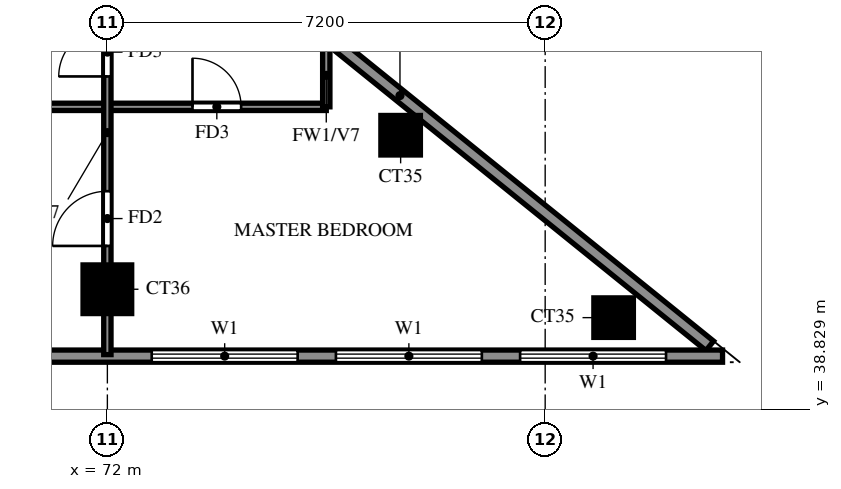
"""IFC4 building model, lengths in metres.
Left out: names, types, materials, properties, quantities, classifications, styles, units other than length and angle.
Written with IfcOpenShell. Run it as: python <this file> out.ifc"""

import sys

from ifc_helpers import new_model, si_unit, direction, frame, frame_2d, origin, origin_2d, place, context, subcontext, project, spatial, rectangle, extrude, source, transform, mapped, element, fill, save


model = new_model("IFC4")
c1 = context("Model", 3, precision=1e-05, world=origin(), true_north=direction((0.0, 1.0)))
c2 = subcontext(c1, "Body", "Model", "MODEL_VIEW")
j1 = project(units=[si_unit("LENGTHUNIT", "METRE"), si_unit("PLANEANGLEUNIT", "RADIAN")], contexts=[c1])
p1 = place(None, origin())
s1 = spatial("IfcSite", under=j1, at=p1, CompositionType="ELEMENT")
p2 = place(p1, origin())
s2 = spatial("IfcBuilding", under=s1, at=p2, CompositionType="ELEMENT")
p3 = place(p2, frame((0.0, 0.0, 250.0)))
s3 = spatial("IfcBuildingStorey", under=s2, at=p3, CompositionType="ELEMENT", Elevation=250.0)
m1 = source(origin(), c2, "Body", "SweptSolid", [
    extrude(rectangle(XDim=0.65, YDim=0.65, at=origin_2d()), origin(), (0.0, 0.0, 1.0), 3.22),
])
p4 = place(p3, frame((80.326, 40.333, 0.0), z_axis=(0.0, 0.0, 1.0), x_axis=(1.0, 0.0, 0.0)))
e1 = element("IfcColumn", 1, at=p4, inside=s3, PredefinedType="COLUMN", context=c2, shape_type="MappedRepresentation", body=[
    mapped(m1, transform((0.0, 0.0, 0.0))),
])
m2 = source(origin(), c2, "Body", "SweptSolid", [
    extrude(rectangle(XDim=0.8, YDim=0.8, at=origin_2d()), origin(), (0.0, 0.0, 1.0), 3.22),
])
p5 = place(p3, frame((72.0, 40.8, 0.0), z_axis=(0.0, 0.0, 1.0), x_axis=(1.0, 0.0, 0.0)))
e2 = element("IfcColumn", 2, at=p5, inside=s3, PredefinedType="COLUMN", context=c2, shape_type="MappedRepresentation", body=[
    mapped(m2, transform((0.0, 0.0, 0.0))),
])
p6 = place(p3, frame((76.823, 43.333, 0.0), z_axis=(0.0, 0.0, 1.0), x_axis=(1.0, 0.0, 0.0)))
e3 = element("IfcColumn", 3, at=p6, inside=s3, PredefinedType="COLUMN", context=c2, shape_type="MappedRepresentation", body=[
    mapped(m1, transform((0.0, 0.0, 0.0))),
])
p7 = place(p3, frame((81.907, 39.87, 0.0), z_axis=(0.0, 0.0, 1.0), x_axis=(-0.777936274417, 0.62834318087, 0.0)))
e4 = element("IfcWall", 4, at=p7, inside=s3, PredefinedType="SOLIDWALL", context=c2, shape_type="SweptSolid", body=[
    extrude(rectangle(XDim=13.099, YDim=0.2, at=frame_2d((6.549, 0.0))), origin(), (0.0, 0.0, 1.0), 3.22),
])
p8 = place(p7, frame((9.938, 0.0, 1.5)))
e5 = element("IfcOpeningElement", 5, at=p8, cuts=e4, PredefinedType="OPENING", context=c2, shape_type="SweptSolid", body=[
    extrude(rectangle(XDim=0.9, YDim=0.9, at=frame_2d((0.45, 0.45))), frame((0.0, 0.11, 0.0), z_axis=(0.0, -1.0, 0.0), x_axis=(1.0, 0.0, 0.0)), (0.0, 0.0, 1.0), 0.22),
])
p9 = place(p3, frame((58.8, 39.7, 0.0), z_axis=(0.0, 0.0, 1.0), x_axis=(1.0, 0.0, 0.0)))
e6 = element("IfcWall", 6, at=p9, inside=s3, PredefinedType="SOLIDWALL", context=c2, shape_type="SweptSolid", body=[
    extrude(rectangle(XDim=23.317, YDim=0.2, at=frame_2d((11.658, 0.0))), origin(), (0.0, 0.0, 1.0), 3.22),
])
p10 = place(p9, frame((6.9, 0.0, 0.0)))
e7 = element("IfcOpeningElement", 7, at=p10, cuts=e6, PredefinedType="OPENING", context=c2, shape_type="SweptSolid", body=[
    extrude(rectangle(XDim=1.8, YDim=2.4, at=frame_2d((0.9, 1.2))), frame((0.0, 0.11, 0.0), z_axis=(0.0, -1.0, 0.0), x_axis=(1.0, 0.0, 0.0)), (0.0, 0.0, 1.0), 0.22),
])
p11 = place(p9, frame((1.5, 0.0, 0.6)))
e8 = element("IfcOpeningElement", 8, at=p11, cuts=e6, PredefinedType="OPENING", context=c2, shape_type="SweptSolid", body=[
    extrude(rectangle(XDim=1.8, YDim=2.4, at=frame_2d((0.9, 1.2))), frame((0.0, 0.11, 0.0), z_axis=(0.0, -1.0, 0.0), x_axis=(1.0, 0.0, 0.0)), (0.0, 0.0, 1.0), 0.22),
])
p12 = place(p9, frame((4.5, 0.0, 0.6)))
e9 = element("IfcOpeningElement", 9, at=p12, cuts=e6, PredefinedType="OPENING", context=c2, shape_type="SweptSolid", body=[
    extrude(rectangle(XDim=1.8, YDim=2.4, at=frame_2d((0.9, 1.2))), frame((0.0, 0.11, 0.0), z_axis=(0.0, -1.0, 0.0), x_axis=(1.0, 0.0, 0.0)), (0.0, 0.0, 1.0), 0.22),
])
p13 = place(p9, frame((13.929, 0.0, 0.6)))
e10 = element("IfcOpeningElement", 10, at=p13, cuts=e6, PredefinedType="OPENING", context=c2, shape_type="SweptSolid", body=[
    extrude(rectangle(XDim=2.4, YDim=2.4, at=frame_2d((1.2, 1.2))), frame((0.0, 0.11, 0.0), z_axis=(0.0, -1.0, 0.0), x_axis=(1.0, 0.0, 0.0)), (0.0, 0.0, 1.0), 0.22),
])
p14 = place(p9, frame((16.958, 0.0, 0.6)))
e11 = element("IfcOpeningElement", 11, at=p14, cuts=e6, PredefinedType="OPENING", context=c2, shape_type="SweptSolid", body=[
    extrude(rectangle(XDim=2.4, YDim=2.4, at=frame_2d((1.2, 1.2))), frame((0.0, 0.11, 0.0), z_axis=(0.0, -1.0, 0.0), x_axis=(1.0, 0.0, 0.0)), (0.0, 0.0, 1.0), 0.22),
])
p15 = place(p9, frame((19.988, 0.0, 0.6)))
e12 = element("IfcOpeningElement", 12, at=p15, cuts=e6, PredefinedType="OPENING", context=c2, shape_type="SweptSolid", body=[
    extrude(rectangle(XDim=2.4, YDim=2.4, at=frame_2d((1.2, 1.2))), frame((0.0, 0.11, 0.0), z_axis=(0.0, -1.0, 0.0), x_axis=(1.0, 0.0, 0.0)), (0.0, 0.0, 1.0), 0.22),
])
p16 = place(p3, frame((60.0, 43.8, 0.0), z_axis=(0.0, 0.0, 1.0), x_axis=(1.0, 0.0, 0.0)))
e13 = element("IfcWall", 13, at=p16, inside=s3, PredefinedType="PARTITIONING", context=c2, shape_type="SweptSolid", body=[
    extrude(rectangle(XDim=15.6, YDim=0.12, at=frame_2d((7.8, 0.0))), origin(), (0.0, 0.0, 1.0), 3.22),
])
p17 = place(p16, frame((9.75, 0.0, 0.0)))
e14 = element("IfcOpeningElement", 14, at=p17, cuts=e13, PredefinedType="OPENING", context=c2, shape_type="SweptSolid", body=[
    extrude(rectangle(XDim=0.9, YDim=2.1, at=frame_2d((0.45, 1.05))), frame((0.0, 0.07, 0.0), z_axis=(0.0, -1.0, 0.0), x_axis=(1.0, 0.0, 0.0)), (0.0, 0.0, 1.0), 0.14),
])
p18 = place(p16, frame((3.45, 0.0, 0.0)))
e15 = element("IfcOpeningElement", 15, at=p18, cuts=e13, PredefinedType="OPENING", context=c2, shape_type="SweptSolid", body=[
    extrude(rectangle(XDim=1.5, YDim=2.1, at=frame_2d((0.75, 1.05))), frame((0.0, 0.07, 0.0), z_axis=(0.0, -1.0, 0.0), x_axis=(1.0, 0.0, 0.0)), (0.0, 0.0, 1.0), 0.14),
])
p19 = place(p16, frame((13.4, 0.0, 0.0)))
e16 = element("IfcOpeningElement", 16, at=p19, cuts=e13, PredefinedType="OPENING", context=c2, shape_type="SweptSolid", body=[
    extrude(rectangle(XDim=0.8, YDim=2.1, at=frame_2d((0.4, 1.05))), frame((0.0, 0.07, 0.0), z_axis=(0.0, -1.0, 0.0), x_axis=(1.0, 0.0, 0.0)), (0.0, 0.0, 1.0), 0.14),
])
p20 = place(p3, frame((72.0, 39.725, 0.0), z_axis=(0.0, 0.0, 1.0), x_axis=(0.0, 1.0, 0.0)))
e17 = element("IfcWall", 17, at=p20, inside=s3, PredefinedType="PARTITIONING", context=c2, shape_type="SweptSolid", body=[
    extrude(rectangle(XDim=8.114, YDim=0.12, at=frame_2d((4.057, 0.0))), origin(), (0.0, 0.0, 1.0), 2.32),
])
p21 = place(p20, frame((1.788, 0.0, 0.0)))
e18 = element("IfcOpeningElement", 18, at=p21, cuts=e17, PredefinedType="OPENING", context=c2, shape_type="SweptSolid", body=[
    extrude(rectangle(XDim=0.9, YDim=2.1, at=frame_2d((0.45, 1.05))), frame((0.0, 0.07, 0.0), z_axis=(0.0, -1.0, 0.0), x_axis=(1.0, 0.0, 0.0)), (0.0, 0.0, 1.0), 0.14),
])
p22 = place(p20, frame((4.575, 0.0, 0.0)))
e19 = element("IfcOpeningElement", 19, at=p22, cuts=e17, PredefinedType="OPENING", context=c2, shape_type="SweptSolid", body=[
    extrude(rectangle(XDim=0.8, YDim=2.1, at=frame_2d((0.4, 1.05))), frame((0.0, 0.07, 0.0), z_axis=(0.0, -1.0, 0.0), x_axis=(1.0, 0.0, 0.0)), (0.0, 0.0, 1.0), 0.14),
])
p23 = place(p3, frame((75.6, 43.8, 0.0), z_axis=(0.0, 0.0, 1.0), x_axis=(0.0, 1.0, 0.0)))
e20 = element("IfcWall", 20, at=p23, inside=s3, PredefinedType="PARTITIONING", context=c2, shape_type="SweptSolid", body=[
    extrude(rectangle(XDim=1.035, YDim=0.12, at=frame_2d((0.518, 0.0))), origin(), (0.0, 0.0, 1.0), 2.32),
])
p24 = place(p13, origin())
e21 = element("IfcWindow", 21, at=p24, inside=s3, PartitioningType="DOUBLE_PANEL_VERTICAL", PredefinedType="WINDOW", context=c2, shape_type="SweptSolid", body=[
    extrude(rectangle(XDim=2.4, YDim=2.4, at=frame_2d((1.2, 1.2))), frame((0.0, 0.03, 0.0), z_axis=(0.0, -1.0, 0.0), x_axis=(1.0, 0.0, 0.0)), (0.0, 0.0, 1.0), 0.06),
])
fill(e10, e21)
p25 = place(p14, origin())
e22 = element("IfcWindow", 22, at=p25, inside=s3, PartitioningType="DOUBLE_PANEL_VERTICAL", PredefinedType="WINDOW", context=c2, shape_type="SweptSolid", body=[
    extrude(rectangle(XDim=2.4, YDim=2.4, at=frame_2d((1.2, 1.2))), frame((0.0, 0.03, 0.0), z_axis=(0.0, -1.0, 0.0), x_axis=(1.0, 0.0, 0.0)), (0.0, 0.0, 1.0), 0.06),
])
fill(e11, e22)
p26 = place(p15, origin())
e23 = element("IfcWindow", 23, at=p26, inside=s3, PartitioningType="DOUBLE_PANEL_VERTICAL", PredefinedType="WINDOW", context=c2, shape_type="SweptSolid", body=[
    extrude(rectangle(XDim=2.4, YDim=2.4, at=frame_2d((1.2, 1.2))), frame((0.0, 0.03, 0.0), z_axis=(0.0, -1.0, 0.0), x_axis=(1.0, 0.0, 0.0)), (0.0, 0.0, 1.0), 0.06),
])
fill(e12, e23)
p27 = place(p21, origin())
e24 = element("IfcDoor", 24, at=p27, inside=s3, OperationType="SINGLE_SWING_LEFT", PredefinedType="DOOR", context=c2, shape_type="SweptSolid", body=[
    extrude(rectangle(XDim=0.9, YDim=2.1, at=frame_2d((0.45, 1.05))), frame((0.0, 0.025, 0.0), z_axis=(0.0, -1.0, 0.0), x_axis=(1.0, 0.0, 0.0)), (0.0, 0.0, 1.0), 0.05),
])
fill(e18, e24)
p28 = place(p22, origin())
e25 = element("IfcDoor", 25, at=p28, inside=s3, OperationType="SINGLE_SWING_LEFT", PredefinedType="DOOR", context=c2, shape_type="SweptSolid", body=[
    extrude(rectangle(XDim=0.8, YDim=2.1, at=frame_2d((0.4, 1.05))), frame((0.0, 0.025, 0.0), z_axis=(0.0, -1.0, 0.0), x_axis=(1.0, 0.0, 0.0)), (0.0, 0.0, 1.0), 0.05),
])
fill(e19, e25)
p29 = place(p19, origin())
e26 = element("IfcDoor", 26, at=p29, inside=s3, OperationType="SINGLE_SWING_LEFT", PredefinedType="DOOR", context=c2, shape_type="SweptSolid", body=[
    extrude(rectangle(XDim=0.8, YDim=2.1, at=frame_2d((0.4, 1.05))), frame((0.0, 0.025, 0.0), z_axis=(0.0, -1.0, 0.0), x_axis=(1.0, 0.0, 0.0)), (0.0, 0.0, 1.0), 0.05),
])
fill(e16, e26)
save(model, sys.argv[1])
